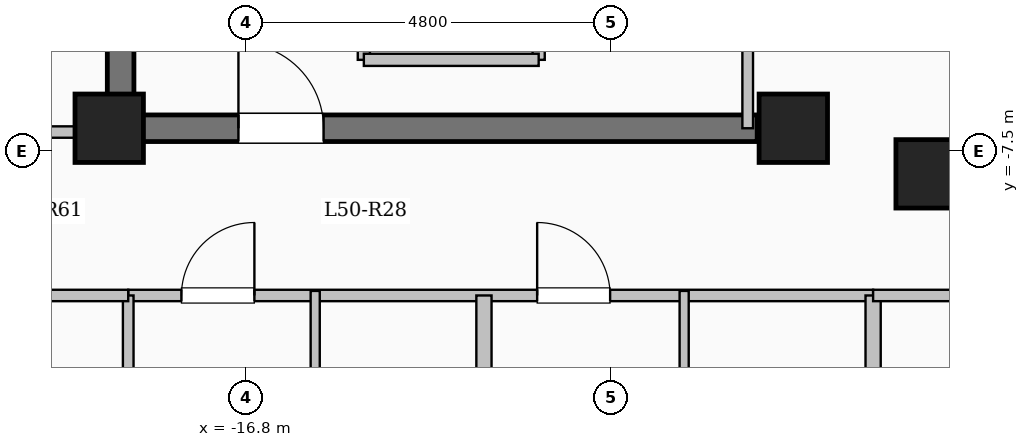
"""IFC4 building model, lengths in metres.
Left out: names, types, materials, properties, quantities, classifications, styles, units other than length and angle.
Written with IfcOpenShell. Run it as: python <this file> out.ifc"""

import sys

from ifc_helpers import new_model, si_unit, direction, frame, frame_2d, origin, origin_2d, place, context, subcontext, project, spatial, rectangle, extrude, element, fill, save


model = new_model("IFC4")
c1 = context("Model", 3, precision=1e-05, world=origin(), true_north=direction((0.0, 1.0)))
c2 = subcontext(c1, "Body", "Model", "MODEL_VIEW")
j1 = project(units=[si_unit("LENGTHUNIT", "METRE"), si_unit("PLANEANGLEUNIT", "RADIAN")], contexts=[c1])
p1 = place(None, origin())
s1 = spatial("IfcSite", under=j1, at=p1, CompositionType="ELEMENT")
p2 = place(p1, origin())
s2 = spatial("IfcBuilding", under=s1, at=p2, CompositionType="ELEMENT")
p3 = place(p2, frame((0.0, 0.0, 186.9)))
s3 = spatial("IfcBuildingStorey", under=s2, at=p3, CompositionType="ELEMENT", Elevation=186.9)
for number, where, z_axis, x_axis in (
    (1, (-7.8, -7.8, 0.0), (0.0, 0.0, 1.0), (1.0, 0.0, 0.0)),
    (2, (-9.6, -7.2, 0.0), (0.0, 0.0, 1.0), (1.0, 0.0, 0.0)),
    (3, (-18.6, -7.2, 0.0), (0.0, 0.0, 1.0), (1.0, 0.0, 0.0)),
):
    element("IfcColumn", number, at=place(p3, frame(where, z_axis=z_axis, x_axis=x_axis)), inside=s3, PredefinedType="COLUMN", context=c2, shape_type="SweptSolid", body=[
        extrude(rectangle(XDim=0.9, YDim=0.9, at=origin_2d()), origin(), (0.0, 0.0, 1.0), 3.35),
    ])
p4 = place(p3, frame((-15.25, -6.3, 0.0), z_axis=(0.0, 0.0, 1.0), x_axis=(0.0, 1.0, 0.0)))
e4 = element("IfcWall", 4, at=p4, inside=s3, PredefinedType="SOLIDWALL", context=c2, shape_type="SweptSolid", body=[
    extrude(rectangle(XDim=2.6, YDim=0.16, at=frame_2d((1.3, 0.0))), origin(), (0.0, 0.0, 1.0), 3.1),
])
p5 = place(p4, frame((0.75, 0.0, 0.0)))
e5 = element("IfcOpeningElement", 5, at=p5, cuts=e4, PredefinedType="OPENING", context=c2, shape_type="SweptSolid", body=[
    extrude(rectangle(XDim=1.1, YDim=2.15, at=frame_2d((0.55, 1.075))), frame((0.0, 0.09, 0.0), z_axis=(0.0, -1.0, 0.0), x_axis=(1.0, 0.0, 0.0)), (0.0, 0.0, 1.0), 0.18),
])
p6 = place(p3, frame((-12.95, -6.3, 0.0), z_axis=(0.0, 0.0, 1.0), x_axis=(0.0, 1.0, 0.0)))
e6 = element("IfcWall", 6, at=p6, inside=s3, PredefinedType="SOLIDWALL", context=c2, shape_type="SweptSolid", body=[
    extrude(rectangle(XDim=2.6, YDim=0.16, at=frame_2d((1.3, 0.0))), origin(), (0.0, 0.0, 1.0), 3.1),
])
p7 = place(p3, frame((-15.25, -6.3, 0.0), z_axis=(0.0, 0.0, 1.0), x_axis=(1.0, 0.0, 0.0)))
e7 = element("IfcWall", 7, at=p7, inside=s3, PredefinedType="SOLIDWALL", context=c2, shape_type="SweptSolid", body=[
    extrude(rectangle(XDim=2.3, YDim=0.16, at=frame_2d((1.15, 0.0))), origin(), (0.0, 0.0, 1.0), 3.1),
])
p8 = place(p3, frame((-18.45, -7.375, 0.0), z_axis=(0.0, 0.0, 1.0), x_axis=(0.0, 1.0, 0.0)))
e8 = element("IfcWall", 8, at=p8, inside=s3, PredefinedType="SHEAR", context=c2, shape_type="SweptSolid", body=[
    extrude(rectangle(XDim=14.05, YDim=0.35, at=frame_2d((7.025, 0.0))), origin(), (0.0, 0.0, 1.0), 3.35),
])
p9 = place(p3, frame((-18.625, -7.2, 0.0), z_axis=(0.0, 0.0, 1.0), x_axis=(1.0, 0.0, 0.0)))
e9 = element("IfcWall", 9, at=p9, inside=s3, PredefinedType="SHEAR", context=c2, shape_type="SweptSolid", body=[
    extrude(rectangle(XDim=8.55, YDim=0.35, at=frame_2d((4.275, 0.0))), origin(), (0.0, 0.0, 1.0), 3.35),
])
p10 = place(p9, frame((1.725, 0.0, 0.0)))
e10 = element("IfcOpeningElement", 10, at=p10, cuts=e9, PredefinedType="OPENING", context=c2, shape_type="SweptSolid", body=[
    extrude(rectangle(XDim=1.12, YDim=2.15, at=frame_2d((0.56, 1.075))), frame((0.0, 0.185, 0.0), z_axis=(0.0, -1.0, 0.0), x_axis=(1.0, 0.0, 0.0)), (0.0, 0.0, 1.0), 0.37),
])
p11 = place(p3, frame((-10.2, -7.2, 0.0), z_axis=(0.0, 0.0, 1.0), x_axis=(0.0, 1.0, 0.0)))
e11 = element("IfcWall", 11, at=p11, inside=s3, PredefinedType="PARTITIONING", context=c2, shape_type="SweptSolid", body=[
    extrude(rectangle(XDim=9.12, YDim=0.14, at=frame_2d((4.56, 0.0))), origin(), (0.0, 0.0, 1.0), 3.1),
])
p12 = place(p11, frame((1.75, 0.0, 0.0)))
e12 = element("IfcOpeningElement", 12, at=p12, cuts=e11, PredefinedType="OPENING", context=c2, shape_type="SweptSolid", body=[
    extrude(rectangle(XDim=0.95, YDim=2.12, at=frame_2d((0.475, 1.06))), frame((0.0, 0.08, 0.0), z_axis=(0.0, -1.0, 0.0), x_axis=(1.0, 0.0, 0.0)), (0.0, 0.0, 1.0), 0.16),
])
p13 = place(p11, frame((5.8, 0.0, 0.0)))
e13 = element("IfcOpeningElement", 13, at=p13, cuts=e11, PredefinedType="OPENING", context=c2, shape_type="SweptSolid", body=[
    extrude(rectangle(XDim=0.95, YDim=2.12, at=frame_2d((0.475, 1.06))), frame((0.0, 0.08, 0.0), z_axis=(0.0, -1.0, 0.0), x_axis=(1.0, 0.0, 0.0)), (0.0, 0.0, 1.0), 0.16),
])
p14 = place(p3, frame((-18.35, -9.4, 0.0), z_axis=(0.0, 0.0, 1.0), x_axis=(1.0, 0.0, 0.0)))
e14 = element("IfcWall", 14, at=p14, inside=s3, PredefinedType="PARTITIONING", context=c2, shape_type="SweptSolid", body=[
    extrude(rectangle(XDim=9.8, YDim=0.15, at=frame_2d((4.9, 0.0))), origin(), (0.0, 0.0, 1.0), 3.1),
])
p15 = place(p14, frame((0.7, 0.0, 0.0)))
e15 = element("IfcOpeningElement", 15, at=p15, cuts=e14, PredefinedType="OPENING", context=c2, shape_type="SweptSolid", body=[
    extrude(rectangle(XDim=0.96, YDim=2.15, at=frame_2d((0.48, 1.075))), frame((0.0, 0.085, 0.0), z_axis=(0.0, -1.0, 0.0), x_axis=(1.0, 0.0, 0.0)), (0.0, 0.0, 1.0), 0.17),
])
p16 = place(p14, frame((5.38, 0.0, 0.0)))
e16 = element("IfcOpeningElement", 16, at=p16, cuts=e14, PredefinedType="OPENING", context=c2, shape_type="SweptSolid", body=[
    extrude(rectangle(XDim=0.96, YDim=2.15, at=frame_2d((0.48, 1.075))), frame((0.0, 0.085, 0.0), z_axis=(0.0, -1.0, 0.0), x_axis=(1.0, 0.0, 0.0)), (0.0, 0.0, 1.0), 0.17),
])
p17 = place(p3, frame((-13.67, -20.9, 0.0), z_axis=(0.0, 0.0, 1.0), x_axis=(0.0, 1.0, 0.0)))
e17 = element("IfcWall", 17, at=p17, inside=s3, PredefinedType="SOLIDWALL", context=c2, shape_type="SweptSolid", body=[
    extrude(rectangle(XDim=11.5, YDim=0.2, at=frame_2d((5.75, 0.0))), origin(), (0.0, 0.0, 1.0), 3.1),
])
p18 = place(p3, frame((-15.89, -12.56, 0.0), z_axis=(0.0, 0.0, 1.0), x_axis=(0.0, 1.0, 0.0)))
e18 = element("IfcWall", 18, at=p18, inside=s3, PredefinedType="PARTITIONING", context=c2, shape_type="SweptSolid", body=[
    extrude(rectangle(XDim=3.22, YDim=0.12, at=frame_2d((1.61, 0.0))), origin(), (0.0, 0.0, 1.0), 3.1),
])
p19 = place(p18, frame((1.14, 0.0, 0.0)))
e19 = element("IfcOpeningElement", 19, at=p19, cuts=e18, PredefinedType="OPENING", context=c2, shape_type="SweptSolid", body=[
    extrude(rectangle(XDim=0.88, YDim=2.1, at=frame_2d((0.44, 1.05))), frame((0.0, 0.07, 0.0), z_axis=(0.0, -1.0, 0.0), x_axis=(1.0, 0.0, 0.0)), (0.0, 0.0, 1.0), 0.14),
])
p20 = place(p3, frame((-11.036, -12.56, 0.0), z_axis=(0.0, 0.0, 1.0), x_axis=(0.0, 1.0, 0.0)))
e20 = element("IfcWall", 20, at=p20, inside=s3, PredefinedType="PARTITIONING", context=c2, shape_type="SweptSolid", body=[
    extrude(rectangle(XDim=3.22, YDim=0.12, at=frame_2d((1.61, 0.0))), origin(), (0.0, 0.0, 1.0), 3.1),
])
p21 = place(p20, frame((1.14, 0.0, 0.0)))
e21 = element("IfcOpeningElement", 21, at=p21, cuts=e20, PredefinedType="OPENING", context=c2, shape_type="SweptSolid", body=[
    extrude(rectangle(XDim=0.88, YDim=2.1, at=frame_2d((0.44, 1.05))), frame((0.0, 0.07, 0.0), z_axis=(0.0, -1.0, 0.0), x_axis=(1.0, 0.0, 0.0)), (0.0, 0.0, 1.0), 0.14),
])
p22 = place(p3, frame((-8.55, -21.504, 0.0), z_axis=(0.0, 0.0, 1.0), x_axis=(0.0, 1.0, 0.0)))
e22 = element("IfcWall", 22, at=p22, inside=s3, PredefinedType="SOLIDWALL", context=c2, shape_type="SweptSolid", body=[
    extrude(rectangle(XDim=12.104, YDim=0.2, at=frame_2d((6.052, 0.0))), origin(), (0.0, 0.0, 1.0), 3.1),
])
p23 = place(p3, frame((-8.55, -9.4, 0.0), z_axis=(0.0, 0.0, 1.0), x_axis=(1.0, 0.0, 0.0)))
e23 = element("IfcWall", 23, at=p23, inside=s3, PredefinedType="PARTITIONING", context=c2, shape_type="SweptSolid", body=[
    extrude(rectangle(XDim=17.1, YDim=0.15, at=frame_2d((8.55, 0.0))), origin(), (0.0, 0.0, 1.0), 3.1),
])
p24 = place(p23, frame((1.9, 0.0, 0.0)))
e24 = element("IfcOpeningElement", 24, at=p24, cuts=e23, PredefinedType="OPENING", context=c2, shape_type="SweptSolid", body=[
    extrude(rectangle(XDim=0.96, YDim=2.15, at=frame_2d((0.48, 1.075))), frame((0.0, 0.085, 0.0), z_axis=(0.0, -1.0, 0.0), x_axis=(1.0, 0.0, 0.0)), (0.0, 0.0, 1.0), 0.17),
])
p25 = place(p3, frame((-23.58, -7.25, 0.0), z_axis=(0.0, 0.0, 1.0), x_axis=(1.0, 0.0, 0.0)))
e25 = element("IfcWall", 25, at=p25, inside=s3, PredefinedType="PARTITIONING", context=c2, shape_type="SweptSolid", body=[
    extrude(rectangle(XDim=5.13, YDim=0.15, at=frame_2d((2.565, 0.0))), origin(), (0.0, 0.0, 1.0), 3.1),
])
p26 = place(p25, frame((2.08, 0.0, 0.0)))
e26 = element("IfcOpeningElement", 26, at=p26, cuts=e25, PredefinedType="OPENING", context=c2, shape_type="SweptSolid", body=[
    extrude(rectangle(XDim=1.08, YDim=2.15, at=frame_2d((0.54, 1.075))), frame((0.0, 0.085, 0.0), z_axis=(0.0, -1.0, 0.0), x_axis=(1.0, 0.0, 0.0)), (0.0, 0.0, 1.0), 0.17),
])
p27 = place(p3, frame((-18.35, -17.25, 0.0), z_axis=(0.0, 0.0, 1.0), x_axis=(0.0, 1.0, 0.0)))
e27 = element("IfcWall", 27, at=p27, inside=s3, PredefinedType="PARTITIONING", context=c2, shape_type="SweptSolid", body=[
    extrude(rectangle(XDim=7.85, YDim=0.14, at=frame_2d((3.925, 0.0))), origin(), (0.0, 0.0, 1.0), 3.1),
])
p28 = place(p3, frame((-23.58, -9.4, 0.0), z_axis=(0.0, 0.0, 1.0), x_axis=(1.0, 0.0, 0.0)))
e28 = element("IfcWall", 28, at=p28, inside=s3, PredefinedType="PARTITIONING", context=c2, shape_type="SweptSolid", body=[
    extrude(rectangle(XDim=5.23, YDim=0.15, at=frame_2d((2.615, 0.0))), origin(), (0.0, 0.0, 1.0), 3.1),
])
p29 = place(p28, frame((2.14, 0.0, 0.0)))
e29 = element("IfcOpeningElement", 29, at=p29, cuts=e28, PredefinedType="OPENING", context=c2, shape_type="SweptSolid", body=[
    extrude(rectangle(XDim=0.95, YDim=2.15, at=frame_2d((0.475, 1.075))), frame((0.0, 0.085, 0.0), z_axis=(0.0, -1.0, 0.0), x_axis=(1.0, 0.0, 0.0)), (0.0, 0.0, 1.0), 0.17),
])
p30 = place(p10, origin())
e30 = element("IfcDoor", 30, at=p30, inside=s3, OperationType="SINGLE_SWING_LEFT", PredefinedType="DOOR", context=c2, shape_type="SweptSolid", body=[
    extrude(rectangle(XDim=1.12, YDim=2.15, at=frame_2d((0.56, 1.075))), frame((0.0, 0.025, 0.0), z_axis=(0.0, -1.0, 0.0), x_axis=(1.0, 0.0, 0.0)), (0.0, 0.0, 1.0), 0.05),
])
fill(e10, e30)
p31 = place(p15, origin())
e31 = element("IfcDoor", 31, at=p31, inside=s3, OperationType="SINGLE_SWING_RIGHT", PredefinedType="DOOR", context=c2, shape_type="SweptSolid", body=[
    extrude(rectangle(XDim=0.96, YDim=2.15, at=frame_2d((0.48, 1.075))), frame((0.0, 0.025, 0.0), z_axis=(0.0, -1.0, 0.0), x_axis=(1.0, 0.0, 0.0)), (0.0, 0.0, 1.0), 0.05),
])
fill(e15, e31)
p32 = place(p16, origin())
e32 = element("IfcDoor", 32, at=p32, inside=s3, OperationType="SINGLE_SWING_LEFT", PredefinedType="DOOR", context=c2, shape_type="SweptSolid", body=[
    extrude(rectangle(XDim=0.96, YDim=2.15, at=frame_2d((0.48, 1.075))), frame((0.0, 0.025, 0.0), z_axis=(0.0, -1.0, 0.0), x_axis=(1.0, 0.0, 0.0)), (0.0, 0.0, 1.0), 0.05),
])
fill(e16, e32)
save(model, sys.argv[1])
